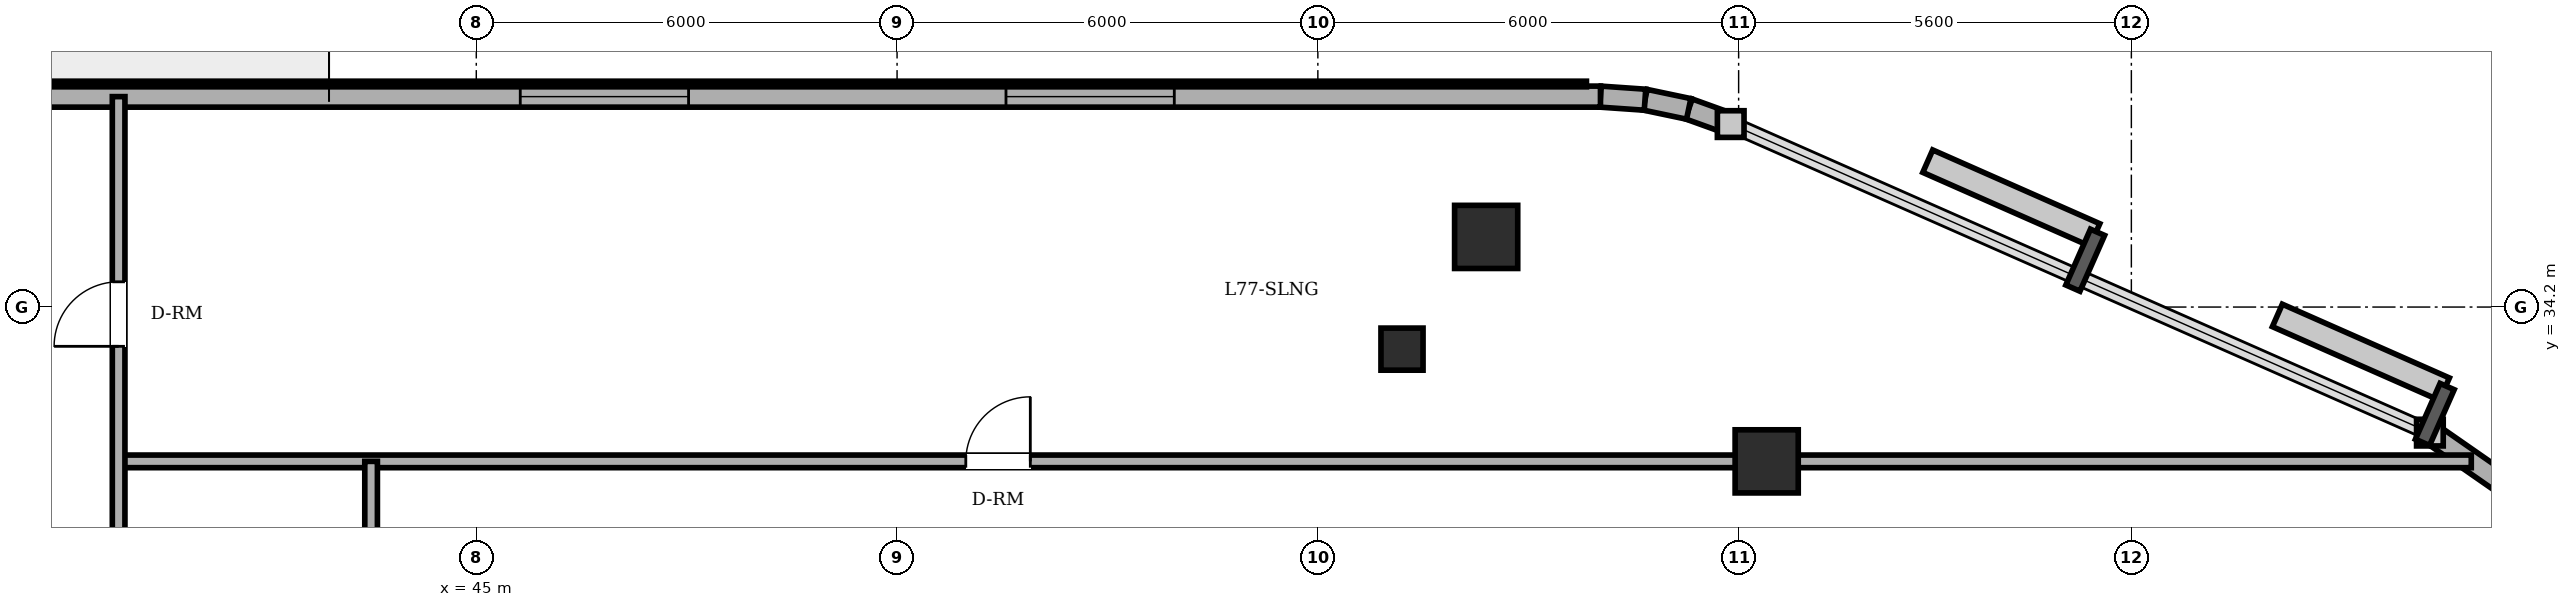
"""IFC4 building model, lengths in metres.
Left out: names, types, materials, properties, quantities, classifications, styles, units other than length and angle.
Written with IfcOpenShell. Run it as: python <this file> out.ifc"""

import sys

from ifc_helpers import new_model, si_unit, direction, frame, frame_2d, origin, origin_2d, place, context, subcontext, project, spatial, rectangle, circle, extrude, element, fill, save


model = new_model("IFC4")
c1 = context("Model", 3, precision=1e-05, world=origin(), true_north=direction((0.0, 1.0)))
c2 = subcontext(c1, "Body", "Model", "MODEL_VIEW")
j1 = project(units=[si_unit("LENGTHUNIT", "METRE"), si_unit("PLANEANGLEUNIT", "RADIAN")], contexts=[c1])
p1 = place(None, origin())
s1 = spatial("IfcSite", under=j1, at=p1, CompositionType="ELEMENT")
p2 = place(p1, origin())
s2 = spatial("IfcBuilding", under=s1, at=p2, CompositionType="ELEMENT")
p3 = place(p2, frame((0.0, 0.0, 295.3)))
s3 = spatial("IfcBuildingStorey", under=s2, at=p3, CompositionType="ELEMENT", Elevation=295.3)
for number, where, z_axis, x_axis in (
    (1, (63.4, 32.0, 0.0), (0.0, 0.0, 1.0), (1.0, 0.0, 0.0)),
    (2, (59.4, 35.2, 0.0), (0.0, 0.0, 1.0), (1.0, 0.0, 0.0)),
):
    element("IfcColumn", number, at=place(p3, frame(where, z_axis=z_axis, x_axis=x_axis)), inside=s3, PredefinedType="COLUMN", context=c2, shape_type="SweptSolid", body=[
        extrude(circle(Radius=0.45, at=origin_2d()), origin(), (0.0, 0.0, 1.0), 5.1),
    ])
p4 = place(p3, frame((58.2, 33.6, 0.0), z_axis=(0.0, 0.0, 1.0), x_axis=(1.0, 0.0, 0.0)))
e3 = element("IfcColumn", 3, at=p4, inside=s3, PredefinedType="COLUMN", context=c2, shape_type="SweptSolid", body=[
    extrude(rectangle(XDim=0.6, YDim=0.6, at=origin_2d()), origin(), (0.0, 0.0, 1.0), 5.1),
])
p5 = place(p3, frame((74.302, 31.405, 0.0), z_axis=(0.0, 0.0, 1.0), x_axis=(-0.821006966142, 0.570918174124, 0.0)))
e4 = element("IfcWall", 4, at=p5, inside=s3, PredefinedType="SOLIDWALL", context=c2, shape_type="SweptSolid", body=[
    extrude(rectangle(XDim=1.76, YDim=0.3, at=frame_2d((0.88, 0.0))), origin(), (0.0, 0.0, 1.0), 4.85),
])
p6 = place(p3, frame((62.887, 36.809, 0.0), z_axis=(0.0, 0.0, 1.0), x_axis=(-0.94077491148, 0.339031806665, 0.0)))
e5 = element("IfcWall", 5, at=p6, inside=s3, PredefinedType="SOLIDWALL", context=c2, shape_type="SweptSolid", body=[
    extrude(rectangle(XDim=0.636, YDim=0.3, at=frame_2d((0.318, 0.0))), origin(), (0.0, 0.0, 1.0), 4.85),
])
p7 = place(p3, frame((62.288, 37.025, 0.0), z_axis=(0.0, 0.0, 1.0), x_axis=(-0.97857012251, 0.205913854149, 0.0)))
e6 = element("IfcWall", 6, at=p7, inside=s3, PredefinedType="SOLIDWALL", context=c2, shape_type="SweptSolid", body=[
    extrude(rectangle(XDim=0.637, YDim=0.3, at=frame_2d((0.318, 0.0))), origin(), (0.0, 0.0, 1.0), 4.85),
])
p8 = place(p3, frame((61.665, 37.156, 0.0), z_axis=(0.0, 0.0, 1.0), x_axis=(-0.997613959688, 0.069039028352, 0.0)))
e7 = element("IfcWall", 7, at=p8, inside=s3, PredefinedType="SOLIDWALL", context=c2, shape_type="SweptSolid", body=[
    extrude(rectangle(XDim=0.636, YDim=0.3, at=frame_2d((0.318, 0.0))), origin(), (0.0, 0.0, 1.0), 4.85),
])
p9 = place(p3, frame((61.03, 37.2, 0.0), z_axis=(0.0, 0.0, 1.0), x_axis=(-1.0, 0.0, 0.0)))
e8 = element("IfcWall", 8, at=p9, inside=s3, PredefinedType="SOLIDWALL", context=c2, shape_type="SweptSolid", body=[
    extrude(rectangle(XDim=37.03, YDim=0.3, at=frame_2d((18.515, 0.0))), origin(), (0.0, 0.0, 1.0), 4.85),
])
p10 = place(p9, frame((31.155, 0.0, 0.0)))
e9 = element("IfcOpeningElement", 9, at=p10, cuts=e8, PredefinedType="OPENING", context=c2, shape_type="SweptSolid", body=[
    extrude(rectangle(XDim=0.95, YDim=2.2, at=frame_2d((0.475, 1.1))), frame((0.0, 0.16, 0.0), z_axis=(0.0, -1.0, 0.0), x_axis=(1.0, 0.0, 0.0)), (0.0, 0.0, 1.0), 0.32),
])
p11 = place(p9, frame((6.077, 0.0, 0.85)))
e10 = element("IfcOpeningElement", 10, at=p11, cuts=e8, PredefinedType="OPENING", context=c2, shape_type="SweptSolid", body=[
    extrude(rectangle(XDim=2.4, YDim=2.1, at=frame_2d((1.2, 1.05))), frame((0.0, 0.16, 0.0), z_axis=(0.0, -1.0, 0.0), x_axis=(1.0, 0.0, 0.0)), (0.0, 0.0, 1.0), 0.32),
])
p12 = place(p9, frame((13.003, 0.0, 0.85)))
e11 = element("IfcOpeningElement", 11, at=p12, cuts=e8, PredefinedType="OPENING", context=c2, shape_type="SweptSolid", body=[
    extrude(rectangle(XDim=2.4, YDim=2.1, at=frame_2d((1.2, 1.05))), frame((0.0, 0.16, 0.0), z_axis=(0.0, -1.0, 0.0), x_axis=(1.0, 0.0, 0.0)), (0.0, 0.0, 1.0), 0.32),
])
p13 = place(p9, frame((25.113, 0.0, 0.85)))
e12 = element("IfcOpeningElement", 12, at=p13, cuts=e8, PredefinedType="OPENING", context=c2, shape_type="SweptSolid", body=[
    extrude(rectangle(XDim=2.4, YDim=2.1, at=frame_2d((1.2, 1.05))), frame((0.0, 0.16, 0.0), z_axis=(0.0, -1.0, 0.0), x_axis=(1.0, 0.0, 0.0)), (0.0, 0.0, 1.0), 0.32),
])
p14 = place(p3, frame((39.9, 32.0, 0.0), z_axis=(0.0, 0.0, 1.0), x_axis=(1.0, 0.0, 0.0)))
e13 = element("IfcWall", 13, at=p14, inside=s3, PredefinedType="PARTITIONING", context=c2, shape_type="SweptSolid", body=[
    extrude(rectangle(XDim=33.547, YDim=0.18, at=frame_2d((16.773, 0.0))), origin(), (0.0, 0.0, 1.0), 4.592),
])
p15 = place(p14, frame((12.08, 0.0, 0.0)))
e14 = element("IfcOpeningElement", 14, at=p15, cuts=e13, PredefinedType="OPENING", context=c2, shape_type="SweptSolid", body=[
    extrude(rectangle(XDim=0.92, YDim=2.1, at=frame_2d((0.46, 1.05))), frame((0.0, 0.1, 0.0), z_axis=(0.0, -1.0, 0.0), x_axis=(1.0, 0.0, 0.0)), (0.0, 0.0, 1.0), 0.2),
])
p16 = place(p3, frame((39.9, 20.8, 0.0), z_axis=(0.0, 0.0, 1.0), x_axis=(0.0, 1.0, 0.0)))
e15 = element("IfcWall", 15, at=p16, inside=s3, PredefinedType="PARTITIONING", context=c2, shape_type="SweptSolid", body=[
    extrude(rectangle(XDim=16.4, YDim=0.18, at=frame_2d((8.2, 0.0))), origin(), (0.0, 0.0, 1.0), 4.85),
])
p17 = place(p16, frame((1.385, 0.0, 0.0)))
e16 = element("IfcOpeningElement", 16, at=p17, cuts=e15, PredefinedType="OPENING", context=c2, shape_type="SweptSolid", body=[
    extrude(rectangle(XDim=0.95, YDim=2.15, at=frame_2d((0.475, 1.075))), frame((0.0, 0.1, 0.0), z_axis=(0.0, -1.0, 0.0), x_axis=(1.0, 0.0, 0.0)), (0.0, 0.0, 1.0), 0.2),
])
p18 = place(p16, frame((4.525, 0.0, 0.0)))
e17 = element("IfcOpeningElement", 17, at=p18, cuts=e15, PredefinedType="OPENING", context=c2, shape_type="SweptSolid", body=[
    extrude(rectangle(XDim=0.95, YDim=2.15, at=frame_2d((0.475, 1.075))), frame((0.0, 0.1, 0.0), z_axis=(0.0, -1.0, 0.0), x_axis=(1.0, 0.0, 0.0)), (0.0, 0.0, 1.0), 0.2),
])
p19 = place(p16, frame((12.84, 0.0, 0.0)))
e18 = element("IfcOpeningElement", 18, at=p19, cuts=e15, PredefinedType="OPENING", context=c2, shape_type="SweptSolid", body=[
    extrude(rectangle(XDim=0.92, YDim=2.1, at=frame_2d((0.46, 1.05))), frame((0.0, 0.1, 0.0), z_axis=(0.0, -1.0, 0.0), x_axis=(1.0, 0.0, 0.0)), (0.0, 0.0, 1.0), 0.2),
])
p20 = place(p3, frame((43.5, 21.0, 0.0), z_axis=(0.0, 0.0, 1.0), x_axis=(0.0, 1.0, 0.0)))
e19 = element("IfcWall", 19, at=p20, inside=s3, PredefinedType="PARTITIONING", context=c2, shape_type="SweptSolid", body=[
    extrude(rectangle(XDim=11.0, YDim=0.18, at=frame_2d((5.5, 0.0))), origin(), (0.0, 0.0, 1.0), 2.432),
])
p21 = place(p11, origin())
e20 = element("IfcWindow", 20, at=p21, inside=s3, PartitioningType="TRIPLE_PANEL_VERTICAL", PredefinedType="WINDOW", context=c2, shape_type="SweptSolid", body=[
    extrude(rectangle(XDim=2.4, YDim=2.1, at=frame_2d((1.2, 1.05))), frame((0.0, 0.03, 0.0), z_axis=(0.0, -1.0, 0.0), x_axis=(1.0, 0.0, 0.0)), (0.0, 0.0, 1.0), 0.06),
])
fill(e10, e20)
p22 = place(p12, origin())
e21 = element("IfcWindow", 21, at=p22, inside=s3, PartitioningType="TRIPLE_PANEL_VERTICAL", PredefinedType="WINDOW", context=c2, shape_type="SweptSolid", body=[
    extrude(rectangle(XDim=2.4, YDim=2.1, at=frame_2d((1.2, 1.05))), frame((0.0, 0.03, 0.0), z_axis=(0.0, -1.0, 0.0), x_axis=(1.0, 0.0, 0.0)), (0.0, 0.0, 1.0), 0.06),
])
fill(e11, e21)
p23 = place(p19, origin())
e22 = element("IfcDoor", 22, at=p23, inside=s3, OperationType="SINGLE_SWING_LEFT", PredefinedType="DOOR", context=c2, shape_type="SweptSolid", body=[
    extrude(rectangle(XDim=0.92, YDim=2.1, at=frame_2d((0.46, 1.05))), frame((0.0, 0.025, 0.0), z_axis=(0.0, -1.0, 0.0), x_axis=(1.0, 0.0, 0.0)), (0.0, 0.0, 1.0), 0.05),
])
fill(e18, e22)
p24 = place(p15, origin())
e23 = element("IfcDoor", 23, at=p24, inside=s3, OperationType="SINGLE_SWING_RIGHT", PredefinedType="DOOR", context=c2, shape_type="SweptSolid", body=[
    extrude(rectangle(XDim=0.92, YDim=2.1, at=frame_2d((0.46, 1.05))), frame((0.0, 0.025, 0.0), z_axis=(0.0, -1.0, 0.0), x_axis=(1.0, 0.0, 0.0)), (0.0, 0.0, 1.0), 0.05),
])
fill(e14, e23)
save(model, sys.argv[1])
